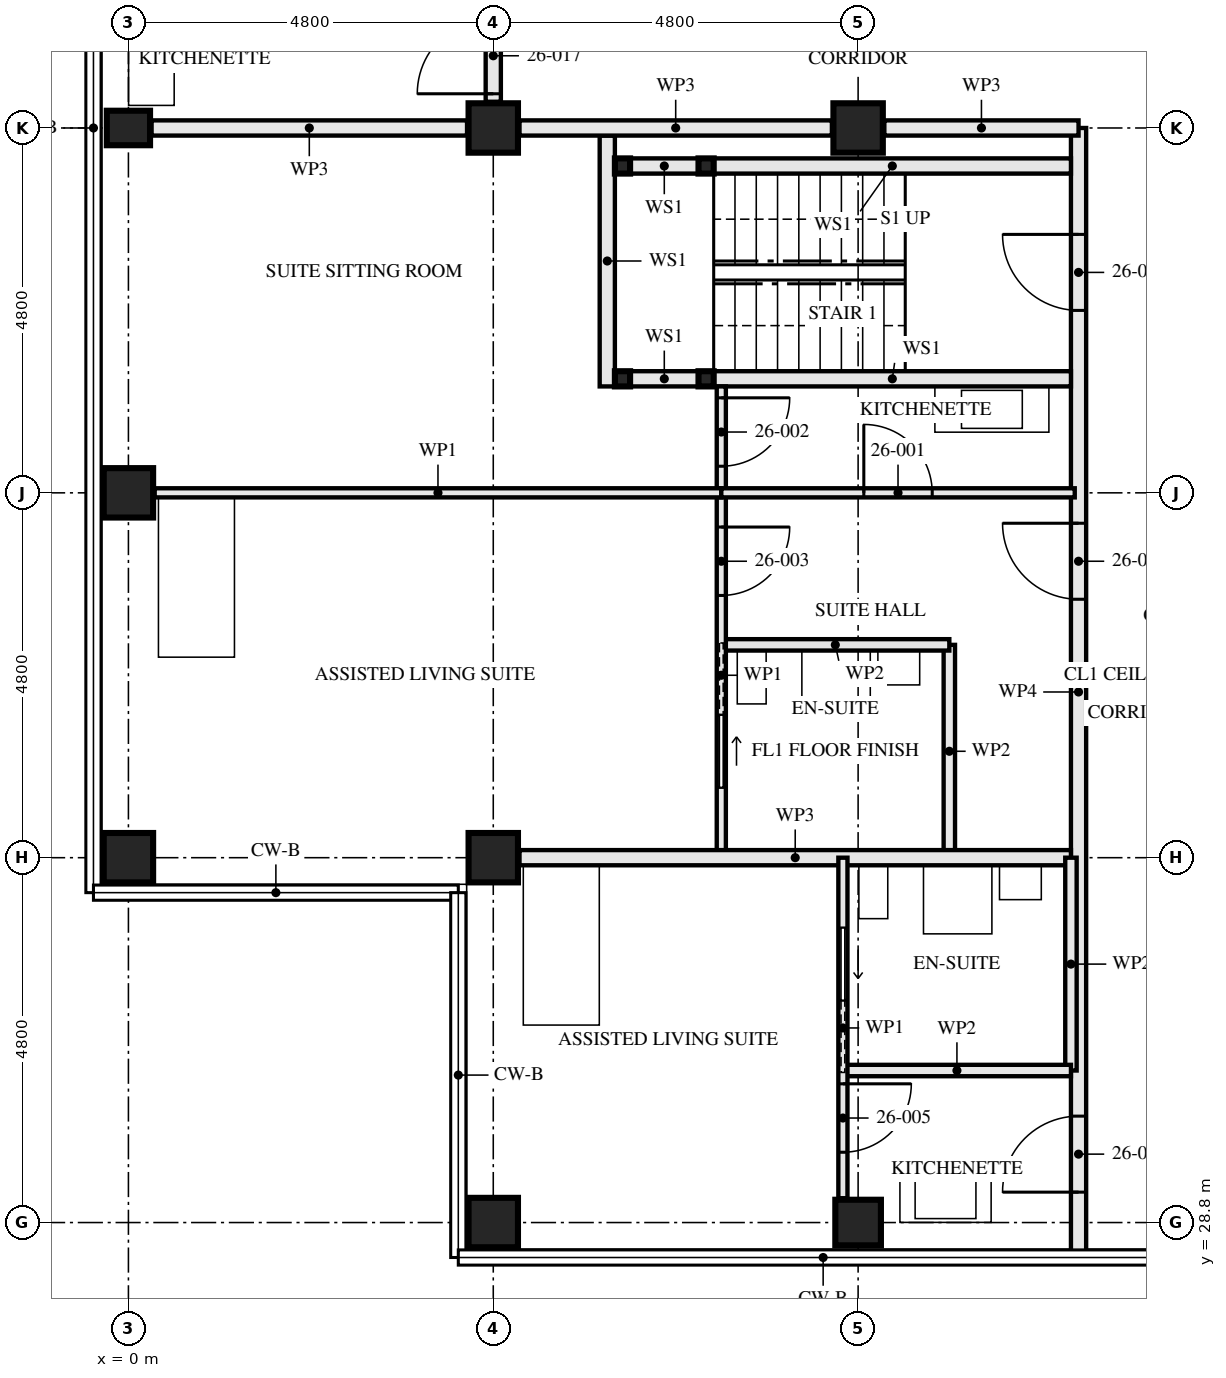
"""IFC4 building model, lengths in metres.
Left out: names, types, materials, properties, quantities, classifications, styles, units other than length and angle.
Written with IfcOpenShell. Run it as: python <this file> out.ifc"""

import sys

from ifc_helpers import new_model, si_unit, direction, frame, frame_2d, origin, origin_2d, place, context, subcontext, project, spatial, rectangle, hollow_rectangle, i_section, extrude, element, fill, save


model = new_model("IFC4")
c1 = context("Model", 3, precision=1e-05, world=origin(), true_north=direction((0.0, 1.0)))
c2 = subcontext(c1, "Body", "Model", "MODEL_VIEW")
j1 = project(units=[si_unit("LENGTHUNIT", "METRE"), si_unit("PLANEANGLEUNIT", "RADIAN")], contexts=[c1])
p1 = place(None, origin())
s1 = spatial("IfcSite", under=j1, at=p1, CompositionType="ELEMENT")
p2 = place(p1, origin())
s2 = spatial("IfcBuilding", under=s1, at=p2, CompositionType="ELEMENT")
p3 = place(p2, frame((0.0, 0.0, 98.0)))
s3 = spatial("IfcBuildingStorey", under=s2, at=p3, CompositionType="ELEMENT", Elevation=98.0)
for number, where, z_axis, x_axis in (
    (1, (0.0, 33.6, 0.0), (0.0, 0.0, 1.0), (0.0, 1.0, 0.0)),
    (2, (0.0, 38.4, 0.0), (0.0, 0.0, 1.0), (1.0, 0.0, 0.0)),
):
    element("IfcColumn", number, at=place(p3, frame(where, z_axis=z_axis, x_axis=x_axis)), inside=s3, PredefinedType="COLUMN", context=c2, shape_type="SweptSolid", body=[
        extrude(hollow_rectangle(XDim=0.65, YDim=0.65, WallThickness=0.08, at=origin_2d()), origin(), (0.0, 0.0, 1.0), 3.5),
    ])
p4 = place(p3, frame((0.0, 43.2, 0.0), z_axis=(0.0, 0.0, 1.0), x_axis=(0.0, 1.0, 0.0)))
e3 = element("IfcColumn", 3, at=p4, inside=s3, PredefinedType="COLUMN", context=c2, shape_type="SweptSolid", body=[
    extrude(i_section(OverallWidth=0.454, OverallDepth=0.569, WebThickness=0.078, FlangeThickness=0.125, FilletRadius=0.015, at=origin_2d()), origin(), (0.0, 0.0, 1.0), 3.5),
])
for number, where, z_axis, x_axis in (
    (4, (4.8, 28.8, 0.0), (0.0, 0.0, 1.0), (0.0, 1.0, 0.0)),
    (5, (4.8, 33.6, 0.0), (0.0, 0.0, 1.0), (0.0, 1.0, 0.0)),
):
    element("IfcColumn", number, at=place(p3, frame(where, z_axis=z_axis, x_axis=x_axis)), inside=s3, PredefinedType="COLUMN", context=c2, shape_type="SweptSolid", body=[
        extrude(hollow_rectangle(XDim=0.65, YDim=0.65, WallThickness=0.08, at=origin_2d()), origin(), (0.0, 0.0, 1.0), 3.5),
    ])
p5 = place(p3, frame((4.8, 43.2, 0.0), z_axis=(0.0, 0.0, 1.0), x_axis=(0.0, 1.0, 0.0)))
e6 = element("IfcColumn", 6, at=p5, inside=s3, PredefinedType="COLUMN", context=c2, shape_type="SweptSolid", body=[
    extrude(hollow_rectangle(XDim=0.65, YDim=0.65, WallThickness=0.05, at=origin_2d()), origin(), (0.0, 0.0, 1.0), 3.5),
])
p6 = place(p3, frame((9.6, 28.8, 0.0), z_axis=(0.0, 0.0, 1.0), x_axis=(0.0, 1.0, 0.0)))
e7 = element("IfcColumn", 7, at=p6, inside=s3, PredefinedType="COLUMN", context=c2, shape_type="SweptSolid", body=[
    extrude(hollow_rectangle(XDim=0.6, YDim=0.6, WallThickness=0.08, at=origin_2d()), origin(), (0.0, 0.0, 1.0), 3.5),
])
p7 = place(p3, frame((9.6, 43.2, 0.0), z_axis=(0.0, 0.0, 1.0), x_axis=(0.0, 1.0, 0.0)))
e8 = element("IfcColumn", 8, at=p7, inside=s3, PredefinedType="COLUMN", context=c2, shape_type="SweptSolid", body=[
    extrude(hollow_rectangle(XDim=0.65, YDim=0.65, WallThickness=0.05, at=origin_2d()), origin(), (0.0, 0.0, 1.0), 3.5),
])
for number, where, z_axis, x_axis in (
    (9, (6.5, 42.7, 0.0), (0.0, 0.0, 1.0), (1.0, 0.0, 0.0)),
    (10, (6.5, 39.9, 0.0), (0.0, 0.0, 1.0), (1.0, 0.0, 0.0)),
    (11, (7.6, 42.7, 0.0), (0.0, 0.0, 1.0), (1.0, 0.0, 0.0)),
    (12, (7.6, 39.9, 0.0), (0.0, 0.0, 1.0), (1.0, 0.0, 0.0)),
):
    element("IfcColumn", number, at=place(p3, frame(where, z_axis=z_axis, x_axis=x_axis)), inside=s3, PredefinedType="COLUMN", context=c2, shape_type="SweptSolid", body=[
        extrude(hollow_rectangle(XDim=0.2, YDim=0.2, WallThickness=0.008, at=origin_2d()), origin(), (0.0, 0.0, 1.0), 3.33),
    ])
p8 = place(p3, frame((6.6, 42.7, 0.0), z_axis=(0.0, 0.0, 1.0), x_axis=(1.0, 0.0, 0.0)))
e13 = element("IfcWall", 13, at=p8, inside=s3, PredefinedType="SOLIDWALL", context=c2, shape_type="SweptSolid", body=[
    extrude(rectangle(XDim=0.9, YDim=0.2, at=frame_2d((0.45, 0.0))), origin(), (0.0, 0.0, 1.0), 2.99),
])
p9 = place(p3, frame((7.7, 42.7, 0.0), z_axis=(0.0, 0.0, 1.0), x_axis=(1.0, 0.0, 0.0)))
e14 = element("IfcWall", 14, at=p9, inside=s3, PredefinedType="SOLIDWALL", context=c2, shape_type="SweptSolid", body=[
    extrude(rectangle(XDim=4.7, YDim=0.2, at=frame_2d((2.35, 0.0))), origin(), (0.0, 0.0, 1.0), 2.99),
])
p10 = place(p3, frame((6.6, 39.9, 0.0), z_axis=(0.0, 0.0, 1.0), x_axis=(1.0, 0.0, 0.0)))
e15 = element("IfcWall", 15, at=p10, inside=s3, PredefinedType="SOLIDWALL", context=c2, shape_type="SweptSolid", body=[
    extrude(rectangle(XDim=0.9, YDim=0.2, at=frame_2d((0.45, 0.0))), origin(), (0.0, 0.0, 1.0), 2.99),
])
p11 = place(p3, frame((7.7, 39.9, 0.0), z_axis=(0.0, 0.0, 1.0), x_axis=(1.0, 0.0, 0.0)))
e16 = element("IfcWall", 16, at=p11, inside=s3, PredefinedType="SOLIDWALL", context=c2, shape_type="SweptSolid", body=[
    extrude(rectangle(XDim=4.7, YDim=0.2, at=frame_2d((2.35, 0.0))), origin(), (0.0, 0.0, 1.0), 2.99),
])
p12 = place(p3, frame((6.3, 43.1, 0.0), z_axis=(0.0, 0.0, 1.0), x_axis=(0.0, -1.0, 0.0)))
e17 = element("IfcWall", 17, at=p12, inside=s3, PredefinedType="SOLIDWALL", context=c2, shape_type="SweptSolid", body=[
    extrude(rectangle(XDim=3.3, YDim=0.2, at=frame_2d((1.65, 0.0))), origin(), (0.0, 0.0, 1.0), 3.33),
])
p13 = place(p3, frame((7.8, 36.4, 0.0), z_axis=(0.0, 0.0, 1.0), x_axis=(1.0, 0.0, 0.0)))
e18 = element("IfcWall", 18, at=p13, inside=s3, PredefinedType="PARTITIONING", context=c2, shape_type="SweptSolid", body=[
    extrude(rectangle(XDim=3.0, YDim=0.15, at=frame_2d((1.5, 0.0))), origin(), (0.0, 0.0, 1.0), 3.33),
])
p14 = place(p3, frame((10.8, 36.4, 0.0), z_axis=(0.0, 0.0, 1.0), x_axis=(0.0, -1.0, 0.0)))
e19 = element("IfcWall", 19, at=p14, inside=s3, PredefinedType="PARTITIONING", context=c2, shape_type="SweptSolid", body=[
    extrude(rectangle(XDim=2.8, YDim=0.15, at=frame_2d((1.4, 0.0))), origin(), (0.0, 0.0, 1.0), 3.33),
])
p15 = place(p3, frame((7.8, 38.4, 0.0), z_axis=(0.0, 0.0, 1.0), x_axis=(1.0, 0.0, 0.0)))
e20 = element("IfcWall", 20, at=p15, inside=s3, PredefinedType="PARTITIONING", context=c2, shape_type="SweptSolid", body=[
    extrude(rectangle(XDim=4.65, YDim=0.12, at=frame_2d((2.325, 0.0))), origin(), (0.0, 0.0, 1.0), 2.55),
])
p16 = place(p15, frame((1.875, 0.0, 0.0)))
e21 = element("IfcOpeningElement", 21, at=p16, cuts=e20, PredefinedType="OPENING", context=c2, shape_type="SweptSolid", body=[
    extrude(rectangle(XDim=0.9, YDim=2.1, at=frame_2d((0.45, 1.05))), frame((0.0, 0.071, 0.0), z_axis=(0.0, -1.0, 0.0), x_axis=(1.0, 0.0, 0.0)), (0.0, 0.0, 1.0), 0.141),
])
p17 = place(p3, frame((7.8, 39.8, 0.0), z_axis=(0.0, 0.0, 1.0), x_axis=(0.0, -1.0, 0.0)))
e22 = element("IfcWall", 22, at=p17, inside=s3, PredefinedType="PARTITIONING", context=c2, shape_type="SweptSolid", body=[
    extrude(rectangle(XDim=1.4, YDim=0.12, at=frame_2d((0.7, 0.0))), origin(), (0.0, 0.0, 1.0), 3.33),
])
p18 = place(p17, frame((0.15, 0.0, 0.0)))
e23 = element("IfcOpeningElement", 23, at=p18, cuts=e22, PredefinedType="OPENING", context=c2, shape_type="SweptSolid", body=[
    extrude(rectangle(XDim=0.9, YDim=2.1, at=frame_2d((0.45, 1.05))), frame((0.0, 0.071, 0.0), z_axis=(0.0, -1.0, 0.0), x_axis=(1.0, 0.0, 0.0)), (0.0, 0.0, 1.0), 0.141),
])
p19 = place(p3, frame((7.8, 38.4, 0.0), z_axis=(0.0, 0.0, 1.0), x_axis=(0.0, -1.0, 0.0)))
e24 = element("IfcWall", 24, at=p19, inside=s3, PredefinedType="PARTITIONING", context=c2, shape_type="SweptSolid", body=[
    extrude(rectangle(XDim=4.8, YDim=0.12, at=frame_2d((2.4, 0.0))), origin(), (0.0, 0.0, 1.0), 3.33),
])
p20 = place(p19, frame((0.45, 0.0, 0.0)))
e25 = element("IfcOpeningElement", 25, at=p20, cuts=e24, PredefinedType="OPENING", context=c2, shape_type="SweptSolid", body=[
    extrude(rectangle(XDim=0.9, YDim=2.1, at=frame_2d((0.45, 1.05))), frame((0.0, 0.071, 0.0), z_axis=(0.0, -1.0, 0.0), x_axis=(1.0, 0.0, 0.0)), (0.0, 0.0, 1.0), 0.141),
])
p21 = place(p19, frame((2.925, 0.0, 0.0)))
e26 = element("IfcOpeningElement", 26, at=p21, cuts=e24, PredefinedType="OPENING", context=c2, shape_type="SweptSolid", body=[
    extrude(rectangle(XDim=0.95, YDim=2.1, at=frame_2d((0.475, 1.05))), frame((0.0, 0.071, 0.0), z_axis=(0.0, -1.0, 0.0), x_axis=(1.0, 0.0, 0.0)), (0.0, 0.0, 1.0), 0.141),
])
p22 = place(p3, frame((0.345, 38.4, 0.0), z_axis=(0.0, 0.0, 1.0), x_axis=(1.0, 0.0, 0.0)))
e27 = element("IfcWall", 27, at=p22, inside=s3, PredefinedType="PARTITIONING", context=c2, shape_type="SweptSolid", body=[
    extrude(rectangle(XDim=7.455, YDim=0.12, at=frame_2d((3.728, 0.0))), origin(), (0.0, 0.0, 1.0), 2.55),
])
p23 = place(p3, frame((5.145, 33.6, 0.0), z_axis=(0.0, 0.0, 1.0), x_axis=(1.0, 0.0, 0.0)))
e28 = element("IfcWall", 28, at=p23, inside=s3, PredefinedType="PARTITIONING", context=c2, shape_type="SweptSolid", body=[
    extrude(rectangle(XDim=7.255, YDim=0.2, at=frame_2d((3.627, 0.0))), origin(), (0.0, 0.0, 1.0), 2.55),
])
p24 = place(p3, frame((9.4, 30.8, 0.0), z_axis=(0.0, 0.0, 1.0), x_axis=(1.0, 0.0, 0.0)))
e29 = element("IfcWall", 29, at=p24, inside=s3, PredefinedType="PARTITIONING", context=c2, shape_type="SweptSolid", body=[
    extrude(rectangle(XDim=3.0, YDim=0.15, at=frame_2d((1.5, 0.0))), origin(), (0.0, 0.0, 1.0), 3.33),
])
p25 = place(p3, frame((12.4, 33.6, 0.0), z_axis=(0.0, 0.0, 1.0), x_axis=(0.0, -1.0, 0.0)))
e30 = element("IfcWall", 30, at=p25, inside=s3, PredefinedType="PARTITIONING", context=c2, shape_type="SweptSolid", body=[
    extrude(rectangle(XDim=2.8, YDim=0.15, at=frame_2d((1.4, 0.0))), origin(), (0.0, 0.0, 1.0), 3.33),
])
p26 = place(p3, frame((9.4, 33.6, 0.0), z_axis=(0.0, 0.0, 1.0), x_axis=(0.0, -1.0, 0.0)))
e31 = element("IfcWall", 31, at=p26, inside=s3, PredefinedType="PARTITIONING", context=c2, shape_type="SweptSolid", body=[
    extrude(rectangle(XDim=4.48, YDim=0.12, at=frame_2d((2.24, 0.0))), origin(), (0.0, 0.0, 1.0), 3.33),
])
p27 = place(p26, frame((2.975, 0.0, 0.0)))
e32 = element("IfcOpeningElement", 32, at=p27, cuts=e31, PredefinedType="OPENING", context=c2, shape_type="SweptSolid", body=[
    extrude(rectangle(XDim=0.9, YDim=2.1, at=frame_2d((0.45, 1.05))), frame((0.0, 0.071, 0.0), z_axis=(0.0, -1.0, 0.0), x_axis=(1.0, 0.0, 0.0)), (0.0, 0.0, 1.0), 0.141),
])
p28 = place(p26, frame((0.925, 0.0, 0.0)))
e33 = element("IfcOpeningElement", 33, at=p28, cuts=e31, PredefinedType="OPENING", context=c2, shape_type="SweptSolid", body=[
    extrude(rectangle(XDim=0.95, YDim=2.1, at=frame_2d((0.475, 1.05))), frame((0.0, 0.071, 0.0), z_axis=(0.0, -1.0, 0.0), x_axis=(1.0, 0.0, 0.0)), (0.0, 0.0, 1.0), 0.141),
])
p29 = place(p3, frame((12.5, 43.2, 0.0), z_axis=(0.0, 0.0, 1.0), x_axis=(0.0, -1.0, 0.0)))
e34 = element("IfcWall", 34, at=p29, inside=s3, PredefinedType="PARTITIONING", context=c2, shape_type="SweptSolid", body=[
    extrude(rectangle(XDim=14.84, YDim=0.2, at=frame_2d((7.42, 0.0))), origin(), (0.0, 0.0, 1.0), 2.32),
])
p30 = place(p29, frame((1.4, 0.0, 0.0)))
e35 = element("IfcOpeningElement", 35, at=p30, cuts=e34, PredefinedType="OPENING", context=c2, shape_type="SweptSolid", body=[
    extrude(rectangle(XDim=1.0, YDim=2.1, at=frame_2d((0.5, 1.05))), frame((0.0, 0.111, 0.0), z_axis=(0.0, -1.0, 0.0), x_axis=(1.0, 0.0, 0.0)), (0.0, 0.0, 1.0), 0.221),
])
p31 = place(p29, frame((5.2, 0.0, 0.0)))
e36 = element("IfcOpeningElement", 36, at=p31, cuts=e34, PredefinedType="OPENING", context=c2, shape_type="SweptSolid", body=[
    extrude(rectangle(XDim=1.0, YDim=2.1, at=frame_2d((0.5, 1.05))), frame((0.0, 0.111, 0.0), z_axis=(0.0, -1.0, 0.0), x_axis=(1.0, 0.0, 0.0)), (0.0, 0.0, 1.0), 0.221),
])
p32 = place(p29, frame((13.0, 0.0, 0.0)))
e37 = element("IfcOpeningElement", 37, at=p32, cuts=e34, PredefinedType="OPENING", context=c2, shape_type="SweptSolid", body=[
    extrude(rectangle(XDim=1.0, YDim=2.1, at=frame_2d((0.5, 1.05))), frame((0.0, 0.111, 0.0), z_axis=(0.0, -1.0, 0.0), x_axis=(1.0, 0.0, 0.0)), (0.0, 0.0, 1.0), 0.221),
])
p33 = place(p3, frame((4.8, 45.2, 0.0), z_axis=(0.0, 0.0, 1.0), x_axis=(0.0, -1.0, 0.0)))
e38 = element("IfcWall", 38, at=p33, inside=s3, PredefinedType="PARTITIONING", context=c2, shape_type="SweptSolid", body=[
    extrude(rectangle(XDim=1.655, YDim=0.2, at=frame_2d((0.828, 0.0))), origin(), (0.0, 0.0, 1.0), 3.33),
])
p34 = place(p33, frame((0.55, 0.0, 0.0)))
e39 = element("IfcOpeningElement", 39, at=p34, cuts=e38, PredefinedType="OPENING", context=c2, shape_type="SweptSolid", body=[
    extrude(rectangle(XDim=1.0, YDim=2.1, at=frame_2d((0.5, 1.05))), frame((0.0, 0.111, 0.0), z_axis=(0.0, -1.0, 0.0), x_axis=(1.0, 0.0, 0.0)), (0.0, 0.0, 1.0), 0.221),
])
p35 = place(p3, frame((12.5, 43.2, 0.0), z_axis=(0.0, 0.0, 1.0), x_axis=(-1.0, 0.0, 0.0)))
e40 = element("IfcWall", 40, at=p35, inside=s3, PredefinedType="PARTITIONING", context=c2, shape_type="SweptSolid", body=[
    extrude(rectangle(XDim=2.555, YDim=0.2, at=frame_2d((1.277, 0.0))), origin(), (0.0, 0.0, 1.0), 2.32),
])
p36 = place(p3, frame((9.255, 43.2, 0.0), z_axis=(0.0, 0.0, 1.0), x_axis=(-1.0, 0.0, 0.0)))
e41 = element("IfcWall", 41, at=p36, inside=s3, PredefinedType="PARTITIONING", context=c2, shape_type="SweptSolid", body=[
    extrude(rectangle(XDim=4.11, YDim=0.2, at=frame_2d((2.055, 0.0))), origin(), (0.0, 0.0, 1.0), 2.32),
])
p37 = place(p3, frame((4.455, 43.2, 0.0), z_axis=(0.0, 0.0, 1.0), x_axis=(-1.0, 0.0, 0.0)))
e42 = element("IfcWall", 42, at=p37, inside=s3, PredefinedType="PARTITIONING", context=c2, shape_type="SweptSolid", body=[
    extrude(rectangle(XDim=4.151, YDim=0.2, at=frame_2d((2.075, 0.0))), origin(), (0.0, 0.0, 1.0), 2.32),
])
p38 = place(p16, origin())
e43 = element("IfcDoor", 43, at=p38, inside=s3, OperationType="SINGLE_SWING_RIGHT", PredefinedType="DOOR", context=c2, shape_type="SweptSolid", body=[
    extrude(rectangle(XDim=0.9, YDim=2.1, at=frame_2d((0.45, 1.05))), frame((0.0, 0.022, 0.0), z_axis=(0.0, -1.0, 0.0), x_axis=(1.0, 0.0, 0.0)), (0.0, 0.0, 1.0), 0.044),
])
fill(e21, e43)
p39 = place(p18, origin())
e44 = element("IfcDoor", 44, at=p39, inside=s3, OperationType="SINGLE_SWING_RIGHT", PredefinedType="DOOR", context=c2, shape_type="SweptSolid", body=[
    extrude(rectangle(XDim=0.9, YDim=2.1, at=frame_2d((0.45, 1.05))), frame((0.0, 0.022, 0.0), z_axis=(0.0, -1.0, 0.0), x_axis=(1.0, 0.0, 0.0)), (0.0, 0.0, 1.0), 0.044),
])
fill(e23, e44)
p40 = place(p20, origin())
e45 = element("IfcDoor", 45, at=p40, inside=s3, OperationType="SINGLE_SWING_RIGHT", PredefinedType="DOOR", context=c2, shape_type="SweptSolid", body=[
    extrude(rectangle(XDim=0.9, YDim=2.1, at=frame_2d((0.45, 1.05))), frame((0.0, 0.022, 0.0), z_axis=(0.0, -1.0, 0.0), x_axis=(1.0, 0.0, 0.0)), (0.0, 0.0, 1.0), 0.044),
])
fill(e25, e45)
p41 = place(p21, origin())
e46 = element("IfcDoor", 46, at=p41, inside=s3, OperationType="SLIDING_TO_RIGHT", PredefinedType="DOOR", context=c2, shape_type="SweptSolid", body=[
    extrude(rectangle(XDim=0.95, YDim=2.1, at=frame_2d((0.475, 1.05))), frame((0.0, 0.022, 0.0), z_axis=(0.0, -1.0, 0.0), x_axis=(1.0, 0.0, 0.0)), (0.0, 0.0, 1.0), 0.044),
])
fill(e26, e46)
p42 = place(p27, origin())
e47 = element("IfcDoor", 47, at=p42, inside=s3, OperationType="SINGLE_SWING_RIGHT", PredefinedType="DOOR", context=c2, shape_type="SweptSolid", body=[
    extrude(rectangle(XDim=0.9, YDim=2.1, at=frame_2d((0.45, 1.05))), frame((0.0, 0.022, 0.0), z_axis=(0.0, -1.0, 0.0), x_axis=(1.0, 0.0, 0.0)), (0.0, 0.0, 1.0), 0.044),
])
fill(e32, e47)
p43 = place(p28, origin())
e48 = element("IfcDoor", 48, at=p43, inside=s3, OperationType="SLIDING_TO_LEFT", PredefinedType="DOOR", context=c2, shape_type="SweptSolid", body=[
    extrude(rectangle(XDim=0.95, YDim=2.1, at=frame_2d((0.475, 1.05))), frame((0.0, 0.022, 0.0), z_axis=(0.0, -1.0, 0.0), x_axis=(1.0, 0.0, 0.0)), (0.0, 0.0, 1.0), 0.044),
])
fill(e33, e48)
p44 = place(p30, frame((1.0, 0.0, 0.0), z_axis=(0.0, 0.0, 1.0), x_axis=(-1.0, 0.0, 0.0)))
e49 = element("IfcDoor", 49, at=p44, inside=s3, OperationType="SINGLE_SWING_LEFT", PredefinedType="DOOR", context=c2, shape_type="SweptSolid", body=[
    extrude(rectangle(XDim=1.0, YDim=2.1, at=frame_2d((0.5, 1.05))), frame((0.0, 0.032, 0.0), z_axis=(0.0, -1.0, 0.0), x_axis=(1.0, 0.0, 0.0)), (0.0, 0.0, 1.0), 0.064),
])
fill(e35, e49)
p45 = place(p31, frame((1.0, 0.0, 0.0), z_axis=(0.0, 0.0, 1.0), x_axis=(-1.0, 0.0, 0.0)))
e50 = element("IfcDoor", 50, at=p45, inside=s3, OperationType="SINGLE_SWING_LEFT", PredefinedType="DOOR", context=c2, shape_type="SweptSolid", body=[
    extrude(rectangle(XDim=1.0, YDim=2.1, at=frame_2d((0.5, 1.05))), frame((0.0, 0.027, 0.0), z_axis=(0.0, -1.0, 0.0), x_axis=(1.0, 0.0, 0.0)), (0.0, 0.0, 1.0), 0.054),
])
fill(e36, e50)
p46 = place(p32, frame((1.0, 0.0, 0.0), z_axis=(0.0, 0.0, 1.0), x_axis=(-1.0, 0.0, 0.0)))
e51 = element("IfcDoor", 51, at=p46, inside=s3, OperationType="SINGLE_SWING_RIGHT", PredefinedType="DOOR", context=c2, shape_type="SweptSolid", body=[
    extrude(rectangle(XDim=1.0, YDim=2.1, at=frame_2d((0.5, 1.05))), frame((0.0, 0.027, 0.0), z_axis=(0.0, -1.0, 0.0), x_axis=(1.0, 0.0, 0.0)), (0.0, 0.0, 1.0), 0.054),
])
fill(e37, e51)
p47 = place(p34, frame((1.0, 0.0, 0.0), z_axis=(0.0, 0.0, 1.0), x_axis=(-1.0, 0.0, 0.0)))
e52 = element("IfcDoor", 52, at=p47, inside=s3, OperationType="SINGLE_SWING_RIGHT", PredefinedType="DOOR", context=c2, shape_type="SweptSolid", body=[
    extrude(rectangle(XDim=1.0, YDim=2.1, at=frame_2d((0.5, 1.05))), frame((0.0, 0.027, 0.0), z_axis=(0.0, -1.0, 0.0), x_axis=(1.0, 0.0, 0.0)), (0.0, 0.0, 1.0), 0.054),
])
fill(e39, e52)
save(model, sys.argv[1])
